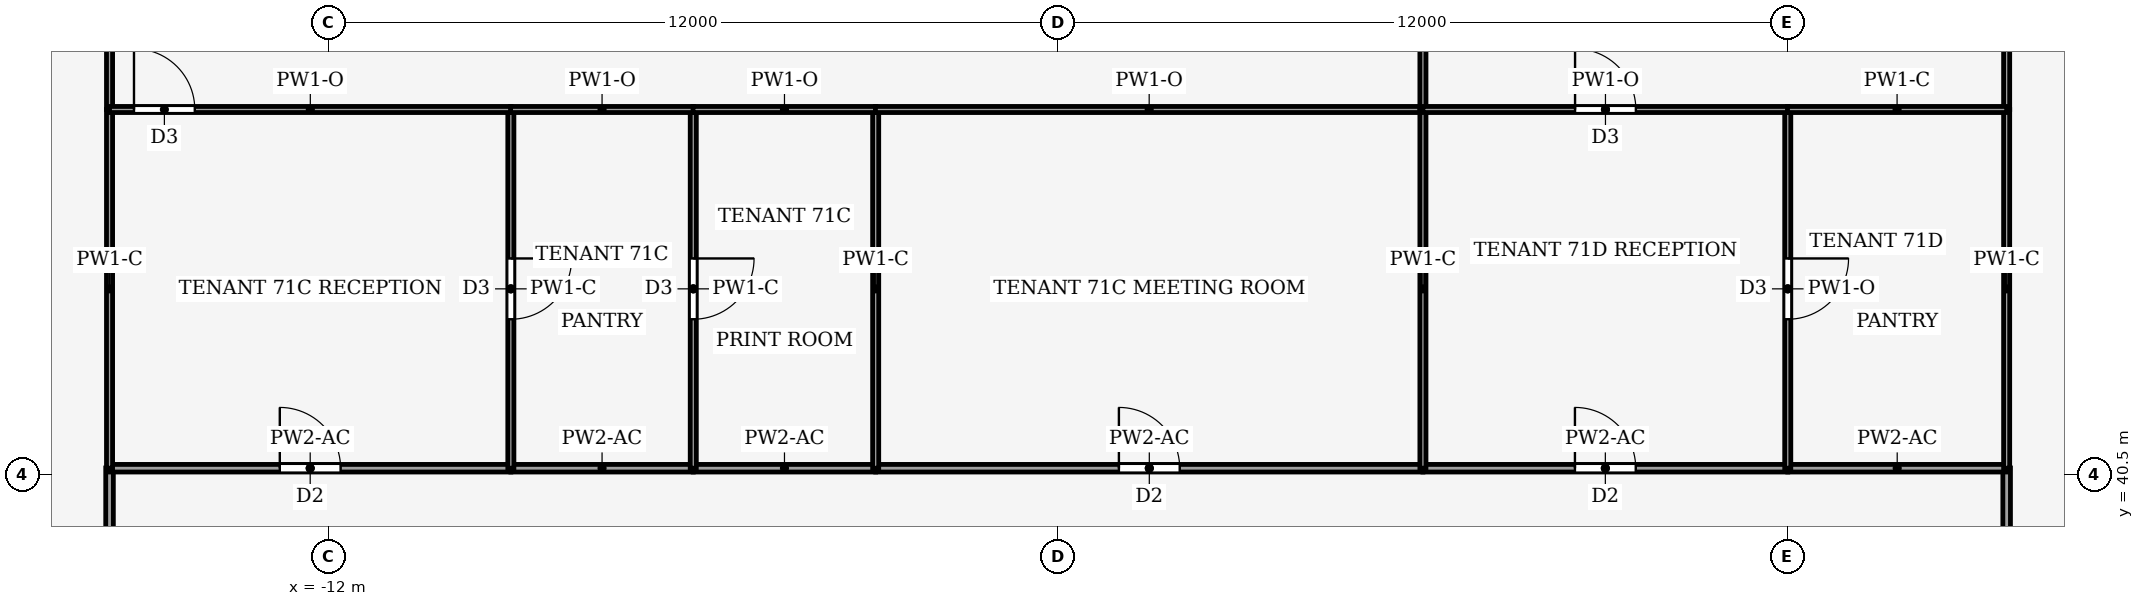
"""IFC4 building model, lengths in metres.
Left out: names, types, materials, properties, quantities, classifications, styles, units other than length and angle.
Written with IfcOpenShell. Run it as: python <this file> out.ifc"""

import sys

from ifc_helpers import new_model, si_unit, direction, frame, frame_2d, origin, place, context, subcontext, project, spatial, rectangle, extrude, element, fill, save


model = new_model("IFC4")
c1 = context("Model", 3, precision=1e-05, world=origin(), true_north=direction((0.0, 1.0)))
c2 = subcontext(c1, "Body", "Model", "MODEL_VIEW")
j1 = project(units=[si_unit("LENGTHUNIT", "METRE"), si_unit("PLANEANGLEUNIT", "RADIAN")], contexts=[c1])
p1 = place(None, origin())
s1 = spatial("IfcSite", under=j1, at=p1, CompositionType="ELEMENT")
p2 = place(p1, origin())
s2 = spatial("IfcBuilding", under=s1, at=p2, CompositionType="ELEMENT")
p3 = place(p2, frame((0.0, 0.0, 310.0)))
s3 = spatial("IfcBuildingStorey", under=s2, at=p3, CompositionType="ELEMENT", Elevation=310.0)
p4 = place(p3, frame((-15.6, 34.5, 0.0), z_axis=(0.0, 0.0, 1.0), x_axis=(0.0, 1.0, 0.0)))
e1 = element("IfcWall", 1, at=p4, inside=s3, PredefinedType="PARTITIONING", context=c2, shape_type="SweptSolid", body=[
    extrude(rectangle(XDim=6.104, YDim=0.125, at=frame_2d((3.052, 0.0))), origin(), (0.0, 0.0, 1.0), 3.14),
])
p5 = place(p4, frame((2.552, 0.0, 0.0)))
e2 = element("IfcOpeningElement", 2, at=p5, cuts=e1, PredefinedType="OPENING", context=c2, shape_type="SweptSolid", body=[
    extrude(rectangle(XDim=1.0, YDim=2.1, at=frame_2d((0.5, 1.05))), frame((0.0, 0.073, 0.0), z_axis=(0.0, -1.0, 0.0), x_axis=(1.0, 0.0, 0.0)), (0.0, 0.0, 1.0), 0.145),
])
p6 = place(p3, frame((15.6, 40.604, 0.0), z_axis=(0.0, 0.0, 1.0), x_axis=(0.0, -1.0, 0.0)))
e3 = element("IfcWall", 3, at=p6, inside=s3, PredefinedType="PARTITIONING", context=c2, shape_type="SweptSolid", body=[
    extrude(rectangle(XDim=6.104, YDim=0.125, at=frame_2d((3.052, 0.0))), origin(), (0.0, 0.0, 1.0), 3.14),
])
p7 = place(p6, frame((2.552, 0.0, 0.0)))
e4 = element("IfcOpeningElement", 4, at=p7, cuts=e3, PredefinedType="OPENING", context=c2, shape_type="SweptSolid", body=[
    extrude(rectangle(XDim=1.0, YDim=2.1, at=frame_2d((0.5, 1.05))), frame((0.0, 0.073, 0.0), z_axis=(0.0, -1.0, 0.0), x_axis=(1.0, 0.0, 0.0)), (0.0, 0.0, 1.0), 0.145),
])
p8 = place(p3, frame((-15.6, 40.6, 0.0), z_axis=(0.0, 0.0, 1.0), x_axis=(1.0, 0.0, 0.0)))
e5 = element("IfcWall", 5, at=p8, inside=s3, PredefinedType="PARTITIONING", context=c2, shape_type="SweptSolid", body=[
    extrude(rectangle(XDim=6.6, YDim=0.125, at=frame_2d((3.3, 0.0))), origin(), (0.0, 0.0, 1.0), 3.39),
])
p9 = place(p8, frame((2.8, 0.0, 0.0)))
e6 = element("IfcOpeningElement", 6, at=p9, cuts=e5, PredefinedType="OPENING", context=c2, shape_type="SweptSolid", body=[
    extrude(rectangle(XDim=1.0, YDim=2.1, at=frame_2d((0.5, 1.05))), frame((0.0, 0.073, 0.0), z_axis=(0.0, -1.0, 0.0), x_axis=(1.0, 0.0, 0.0)), (0.0, 0.0, 1.0), 0.145),
])
for number, where, z_axis, x_axis in (
    (7, (-6.0, 40.6, 0.0), (0.0, 0.0, 1.0), (-1.0, 0.0, 0.0)),
    (8, (-3.0, 40.6, 0.0), (0.0, 0.0, 1.0), (-1.0, 0.0, 0.0)),
):
    element("IfcWall", number, at=place(p3, frame(where, z_axis=z_axis, x_axis=x_axis)), inside=s3, PredefinedType="PARTITIONING", context=c2, shape_type="SweptSolid", body=[
        extrude(rectangle(XDim=3.0, YDim=0.125, at=frame_2d((1.5, 0.0))), origin(), (0.0, 0.0, 1.0), 3.39),
    ])
p10 = place(p3, frame((-3.0, 40.6, 0.0), z_axis=(0.0, 0.0, 1.0), x_axis=(1.0, 0.0, 0.0)))
e9 = element("IfcWall", 9, at=p10, inside=s3, PredefinedType="PARTITIONING", context=c2, shape_type="SweptSolid", body=[
    extrude(rectangle(XDim=9.0, YDim=0.125, at=frame_2d((4.5, 0.0))), origin(), (0.0, 0.0, 1.0), 3.39),
])
p11 = place(p10, frame((4.0, 0.0, 0.0)))
e10 = element("IfcOpeningElement", 10, at=p11, cuts=e9, PredefinedType="OPENING", context=c2, shape_type="SweptSolid", body=[
    extrude(rectangle(XDim=1.0, YDim=2.1, at=frame_2d((0.5, 1.05))), frame((0.0, 0.073, 0.0), z_axis=(0.0, -1.0, 0.0), x_axis=(1.0, 0.0, 0.0)), (0.0, 0.0, 1.0), 0.145),
])
p12 = place(p3, frame((6.0, 40.6, 0.0), z_axis=(0.0, 0.0, 1.0), x_axis=(1.0, 0.0, 0.0)))
e11 = element("IfcWall", 11, at=p12, inside=s3, PredefinedType="PARTITIONING", context=c2, shape_type="SweptSolid", body=[
    extrude(rectangle(XDim=6.0, YDim=0.125, at=frame_2d((3.0, 0.0))), origin(), (0.0, 0.0, 1.0), 3.39),
])
p13 = place(p12, frame((2.5, 0.0, 0.0)))
e12 = element("IfcOpeningElement", 12, at=p13, cuts=e11, PredefinedType="OPENING", context=c2, shape_type="SweptSolid", body=[
    extrude(rectangle(XDim=1.0, YDim=2.1, at=frame_2d((0.5, 1.05))), frame((0.0, 0.073, 0.0), z_axis=(0.0, -1.0, 0.0), x_axis=(1.0, 0.0, 0.0)), (0.0, 0.0, 1.0), 0.145),
])
p14 = place(p3, frame((15.6, 40.6, 0.0), z_axis=(0.0, 0.0, 1.0), x_axis=(-1.0, 0.0, 0.0)))
e13 = element("IfcWall", 13, at=p14, inside=s3, PredefinedType="PARTITIONING", context=c2, shape_type="SweptSolid", body=[
    extrude(rectangle(XDim=3.6, YDim=0.125, at=frame_2d((1.8, 0.0))), origin(), (0.0, 0.0, 1.0), 3.39),
])
p15 = place(p3, frame((-15.6, 40.6, 0.0), z_axis=(0.0, 0.0, 1.0), x_axis=(0.0, 1.0, 0.0)))
e14 = element("IfcWall", 14, at=p15, inside=s3, PredefinedType="PARTITIONING", context=c2, shape_type="SweptSolid", body=[
    extrude(rectangle(XDim=5.9, YDim=0.1, at=frame_2d((2.95, 0.0))), origin(), (0.0, 0.0, 1.0), 3.87),
])
p16 = place(p3, frame((-15.6, 46.5, 0.0), z_axis=(0.0, 0.0, 1.0), x_axis=(0.0, 1.0, 0.0)))
e15 = element("IfcWall", 15, at=p16, inside=s3, PredefinedType="PARTITIONING", context=c2, shape_type="SweptSolid", body=[
    extrude(rectangle(XDim=15.0, YDim=0.1, at=frame_2d((7.5, 0.0))), origin(), (0.0, 0.0, 1.0), 3.35),
])
p17 = place(p3, frame((15.6, 46.5, 0.0), z_axis=(0.0, 0.0, 1.0), x_axis=(0.0, -1.0, 0.0)))
e16 = element("IfcWall", 16, at=p17, inside=s3, PredefinedType="PARTITIONING", context=c2, shape_type="SweptSolid", body=[
    extrude(rectangle(XDim=5.9, YDim=0.1, at=frame_2d((2.95, 0.0))), origin(), (0.0, 0.0, 1.0), 3.87),
])
p18 = place(p3, frame((15.6, 61.5, 0.0), z_axis=(0.0, 0.0, 1.0), x_axis=(0.0, -1.0, 0.0)))
e17 = element("IfcWall", 17, at=p18, inside=s3, PredefinedType="PARTITIONING", context=c2, shape_type="SweptSolid", body=[
    extrude(rectangle(XDim=15.0, YDim=0.1, at=frame_2d((7.5, 0.0))), origin(), (0.0, 0.0, 1.0), 3.35),
])
p19 = place(p3, frame((-9.0, 46.5, 0.0), z_axis=(0.0, 0.0, 1.0), x_axis=(0.0, -1.0, 0.0)))
e18 = element("IfcWall", 18, at=p19, inside=s3, PredefinedType="PARTITIONING", context=c2, shape_type="SweptSolid", body=[
    extrude(rectangle(XDim=5.9, YDim=0.1, at=frame_2d((2.95, 0.0))), origin(), (0.0, 0.0, 1.0), 3.87),
])
p20 = place(p19, frame((2.45, 0.0, 0.0)))
e19 = element("IfcOpeningElement", 19, at=p20, cuts=e18, PredefinedType="OPENING", context=c2, shape_type="SweptSolid", body=[
    extrude(rectangle(XDim=1.0, YDim=2.1, at=frame_2d((0.5, 1.05))), frame((0.0, 0.06, 0.0), z_axis=(0.0, -1.0, 0.0), x_axis=(1.0, 0.0, 0.0)), (0.0, 0.0, 1.0), 0.12),
])
p21 = place(p3, frame((-15.6, 46.5, 0.0), z_axis=(0.0, 0.0, 1.0), x_axis=(1.0, 0.0, 0.0)))
e20 = element("IfcWall", 20, at=p21, inside=s3, PredefinedType="PARTITIONING", context=c2, shape_type="SweptSolid", body=[
    extrude(rectangle(XDim=6.604, YDim=0.1, at=frame_2d((3.302, 0.0))), origin(), (0.0, 0.0, 1.0), 3.39),
])
p22 = place(p21, frame((0.402, 0.0, 0.0)))
e21 = element("IfcOpeningElement", 21, at=p22, cuts=e20, PredefinedType="OPENING", context=c2, shape_type="SweptSolid", body=[
    extrude(rectangle(XDim=1.0, YDim=2.1, at=frame_2d((0.5, 1.05))), frame((0.0, 0.06, 0.0), z_axis=(0.0, -1.0, 0.0), x_axis=(1.0, 0.0, 0.0)), (0.0, 0.0, 1.0), 0.12),
])
p23 = place(p3, frame((-6.0, 46.5, 0.0), z_axis=(0.0, 0.0, 1.0), x_axis=(0.0, -1.0, 0.0)))
e22 = element("IfcWall", 22, at=p23, inside=s3, PredefinedType="PARTITIONING", context=c2, shape_type="SweptSolid", body=[
    extrude(rectangle(XDim=5.9, YDim=0.1, at=frame_2d((2.95, 0.0))), origin(), (0.0, 0.0, 1.0), 3.87),
])
p24 = place(p23, frame((2.45, 0.0, 0.0)))
e23 = element("IfcOpeningElement", 23, at=p24, cuts=e22, PredefinedType="OPENING", context=c2, shape_type="SweptSolid", body=[
    extrude(rectangle(XDim=1.0, YDim=2.1, at=frame_2d((0.5, 1.05))), frame((0.0, 0.06, 0.0), z_axis=(0.0, -1.0, 0.0), x_axis=(1.0, 0.0, 0.0)), (0.0, 0.0, 1.0), 0.12),
])
p25 = place(p3, frame((-5.996, 46.5, 0.0), z_axis=(0.0, 0.0, 1.0), x_axis=(-1.0, 0.0, 0.0)))
e24 = element("IfcWall", 24, at=p25, inside=s3, PredefinedType="PARTITIONING", context=c2, shape_type="SweptSolid", body=[
    extrude(rectangle(XDim=3.008, YDim=0.1, at=frame_2d((1.504, 0.0))), origin(), (0.0, 0.0, 1.0), 3.39),
])
p26 = place(p3, frame((-3.0, 40.6, 0.0), z_axis=(0.0, 0.0, 1.0), x_axis=(0.0, 1.0, 0.0)))
e25 = element("IfcWall", 25, at=p26, inside=s3, PredefinedType="PARTITIONING", context=c2, shape_type="SweptSolid", body=[
    extrude(rectangle(XDim=5.9, YDim=0.1, at=frame_2d((2.95, 0.0))), origin(), (0.0, 0.0, 1.0), 3.87),
])
p27 = place(p3, frame((-2.996, 46.5, 0.0), z_axis=(0.0, 0.0, 1.0), x_axis=(-1.0, 0.0, 0.0)))
e26 = element("IfcWall", 26, at=p27, inside=s3, PredefinedType="PARTITIONING", context=c2, shape_type="SweptSolid", body=[
    extrude(rectangle(XDim=3.008, YDim=0.1, at=frame_2d((1.504, 0.0))), origin(), (0.0, 0.0, 1.0), 3.39),
])
p28 = place(p3, frame((6.0, 46.5, 0.0), z_axis=(0.0, 0.0, 1.0), x_axis=(-1.0, 0.0, 0.0)))
e27 = element("IfcWall", 27, at=p28, inside=s3, PredefinedType="PARTITIONING", context=c2, shape_type="SweptSolid", body=[
    extrude(rectangle(XDim=9.004, YDim=0.1, at=frame_2d((4.502, 0.0))), origin(), (0.0, 0.0, 1.0), 3.39),
])
p29 = place(p3, frame((6.0, 40.6, 0.0), z_axis=(0.0, 0.0, 1.0), x_axis=(0.0, 1.0, 0.0)))
e28 = element("IfcWall", 28, at=p29, inside=s3, PredefinedType="PARTITIONING", context=c2, shape_type="SweptSolid", body=[
    extrude(rectangle(XDim=5.9, YDim=0.1, at=frame_2d((2.95, 0.0))), origin(), (0.0, 0.0, 1.0), 3.87),
])
p30 = place(p3, frame((6.0, 46.5, 0.0), z_axis=(0.0, 0.0, 1.0), x_axis=(0.0, 1.0, 0.0)))
e29 = element("IfcWall", 29, at=p30, inside=s3, PredefinedType="PARTITIONING", context=c2, shape_type="SweptSolid", body=[
    extrude(rectangle(XDim=15.0, YDim=0.1, at=frame_2d((7.5, 0.0))), origin(), (0.0, 0.0, 1.0), 3.24),
])
p31 = place(p3, frame((12.0, 46.5, 0.0), z_axis=(0.0, 0.0, 1.0), x_axis=(0.0, -1.0, 0.0)))
e30 = element("IfcWall", 30, at=p31, inside=s3, PredefinedType="PARTITIONING", context=c2, shape_type="SweptSolid", body=[
    extrude(rectangle(XDim=5.9, YDim=0.1, at=frame_2d((2.95, 0.0))), origin(), (0.0, 0.0, 1.0), 3.39),
])
p32 = place(p31, frame((2.45, 0.0, 0.0)))
e31 = element("IfcOpeningElement", 31, at=p32, cuts=e30, PredefinedType="OPENING", context=c2, shape_type="SweptSolid", body=[
    extrude(rectangle(XDim=1.0, YDim=2.1, at=frame_2d((0.5, 1.05))), frame((0.0, 0.06, 0.0), z_axis=(0.0, -1.0, 0.0), x_axis=(1.0, 0.0, 0.0)), (0.0, 0.0, 1.0), 0.12),
])
p33 = place(p3, frame((6.0, 46.5, 0.0), z_axis=(0.0, 0.0, 1.0), x_axis=(1.0, 0.0, 0.0)))
e32 = element("IfcWall", 32, at=p33, inside=s3, PredefinedType="PARTITIONING", context=c2, shape_type="SweptSolid", body=[
    extrude(rectangle(XDim=6.004, YDim=0.1, at=frame_2d((3.002, 0.0))), origin(), (0.0, 0.0, 1.0), 3.39),
])
p34 = place(p33, frame((2.502, 0.0, 0.0)))
e33 = element("IfcOpeningElement", 33, at=p34, cuts=e32, PredefinedType="OPENING", context=c2, shape_type="SweptSolid", body=[
    extrude(rectangle(XDim=1.0, YDim=2.1, at=frame_2d((0.5, 1.05))), frame((0.0, 0.06, 0.0), z_axis=(0.0, -1.0, 0.0), x_axis=(1.0, 0.0, 0.0)), (0.0, 0.0, 1.0), 0.12),
])
p35 = place(p3, frame((15.6, 46.5, 0.0), z_axis=(0.0, 0.0, 1.0), x_axis=(-1.0, 0.0, 0.0)))
e34 = element("IfcWall", 34, at=p35, inside=s3, PredefinedType="PARTITIONING", context=c2, shape_type="SweptSolid", body=[
    extrude(rectangle(XDim=3.604, YDim=0.1, at=frame_2d((1.802, 0.0))), origin(), (0.0, 0.0, 1.0), 3.87),
])
p36 = place(p9, origin())
e35 = element("IfcDoor", 35, at=p36, inside=s3, OperationType="SINGLE_SWING_RIGHT", PredefinedType="DOOR", context=c2, shape_type="SweptSolid", body=[
    extrude(rectangle(XDim=1.0, YDim=2.1, at=frame_2d((0.5, 1.05))), frame((0.0, 0.025, 0.0), z_axis=(0.0, -1.0, 0.0), x_axis=(1.0, 0.0, 0.0)), (0.0, 0.0, 1.0), 0.05),
])
fill(e6, e35)
p37 = place(p11, origin())
e36 = element("IfcDoor", 36, at=p37, inside=s3, OperationType="SINGLE_SWING_LEFT", PredefinedType="DOOR", context=c2, shape_type="SweptSolid", body=[
    extrude(rectangle(XDim=1.0, YDim=2.1, at=frame_2d((0.5, 1.05))), frame((0.0, 0.025, 0.0), z_axis=(0.0, -1.0, 0.0), x_axis=(1.0, 0.0, 0.0)), (0.0, 0.0, 1.0), 0.05),
])
fill(e10, e36)
p38 = place(p13, origin())
e37 = element("IfcDoor", 37, at=p38, inside=s3, OperationType="SINGLE_SWING_RIGHT", PredefinedType="DOOR", context=c2, shape_type="SweptSolid", body=[
    extrude(rectangle(XDim=1.0, YDim=2.1, at=frame_2d((0.5, 1.05))), frame((0.0, 0.025, 0.0), z_axis=(0.0, -1.0, 0.0), x_axis=(1.0, 0.0, 0.0)), (0.0, 0.0, 1.0), 0.05),
])
fill(e12, e37)
p39 = place(p20, origin())
e38 = element("IfcDoor", 38, at=p39, inside=s3, OperationType="SINGLE_SWING_LEFT", PredefinedType="DOOR", context=c2, shape_type="SweptSolid", body=[
    extrude(rectangle(XDim=1.0, YDim=2.1, at=frame_2d((0.5, 1.05))), frame((0.0, 0.025, 0.0), z_axis=(0.0, -1.0, 0.0), x_axis=(1.0, 0.0, 0.0)), (0.0, 0.0, 1.0), 0.05),
])
fill(e19, e38)
p40 = place(p22, origin())
e39 = element("IfcDoor", 39, at=p40, inside=s3, OperationType="SINGLE_SWING_LEFT", PredefinedType="DOOR", context=c2, shape_type="SweptSolid", body=[
    extrude(rectangle(XDim=1.0, YDim=2.1, at=frame_2d((0.5, 1.05))), frame((0.0, 0.025, 0.0), z_axis=(0.0, -1.0, 0.0), x_axis=(1.0, 0.0, 0.0)), (0.0, 0.0, 1.0), 0.05),
])
fill(e21, e39)
p41 = place(p24, origin())
e40 = element("IfcDoor", 40, at=p41, inside=s3, OperationType="SINGLE_SWING_LEFT", PredefinedType="DOOR", context=c2, shape_type="SweptSolid", body=[
    extrude(rectangle(XDim=1.0, YDim=2.1, at=frame_2d((0.5, 1.05))), frame((0.0, 0.025, 0.0), z_axis=(0.0, -1.0, 0.0), x_axis=(1.0, 0.0, 0.0)), (0.0, 0.0, 1.0), 0.05),
])
fill(e23, e40)
p42 = place(p32, origin())
e41 = element("IfcDoor", 41, at=p42, inside=s3, OperationType="SINGLE_SWING_LEFT", PredefinedType="DOOR", context=c2, shape_type="SweptSolid", body=[
    extrude(rectangle(XDim=1.0, YDim=2.1, at=frame_2d((0.5, 1.05))), frame((0.0, 0.025, 0.0), z_axis=(0.0, -1.0, 0.0), x_axis=(1.0, 0.0, 0.0)), (0.0, 0.0, 1.0), 0.05),
])
fill(e31, e41)
p43 = place(p34, origin())
e42 = element("IfcDoor", 42, at=p43, inside=s3, OperationType="SINGLE_SWING_RIGHT", PredefinedType="DOOR", context=c2, shape_type="SweptSolid", body=[
    extrude(rectangle(XDim=1.0, YDim=2.1, at=frame_2d((0.5, 1.05))), frame((0.0, 0.025, 0.0), z_axis=(0.0, -1.0, 0.0), x_axis=(1.0, 0.0, 0.0)), (0.0, 0.0, 1.0), 0.05),
])
fill(e33, e42)
save(model, sys.argv[1])
